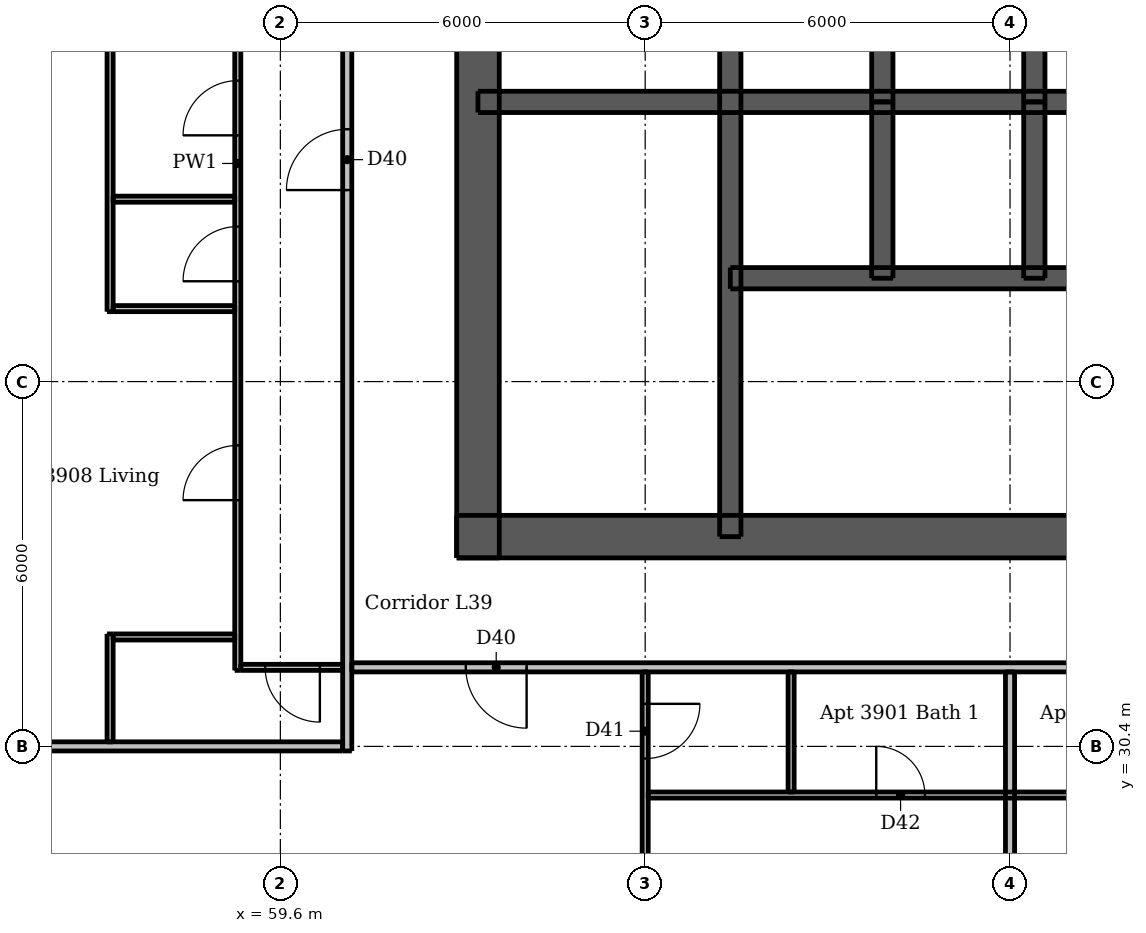
"""IFC4 building model, lengths in metres.
Left out: names, types, materials, properties, quantities, classifications, styles, units other than length and angle.
Written with IfcOpenShell. Run it as: python <this file> out.ifc"""

import sys

from ifc_helpers import new_model, si_unit, direction, frame, frame_2d, origin, place, context, subcontext, project, spatial, rectangle, extrude, element, fill, save


model = new_model("IFC4")
c1 = context("Model", 3, precision=1e-05, world=origin(), true_north=direction((0.0, 1.0)))
c2 = subcontext(c1, "Body", "Model", "MODEL_VIEW")
j1 = project(units=[si_unit("LENGTHUNIT", "METRE"), si_unit("PLANEANGLEUNIT", "RADIAN")], contexts=[c1])
p1 = place(None, origin())
s1 = spatial("IfcSite", under=j1, at=p1, CompositionType="ELEMENT")
p2 = place(p1, origin())
s2 = spatial("IfcBuilding", under=s1, at=p2, CompositionType="ELEMENT")
p3 = place(p2, frame((0.0, 0.0, 147.1)))
s3 = spatial("IfcBuildingStorey", under=s2, at=p3, CompositionType="ELEMENT", Elevation=147.1)
p4 = place(p3, frame((62.5, 33.85, 0.0), z_axis=(0.0, 0.0, 1.0), x_axis=(1.0, 0.0, 0.0)))
e1 = element("IfcWall", 1, at=p4, inside=s3, PredefinedType="SHEAR", context=c2, shape_type="SweptSolid", body=[
    extrude(rectangle(XDim=24.0, YDim=0.7, at=frame_2d((12.0, 0.0))), origin(), (0.0, 0.0, 1.0), 3.0),
])
p5 = place(p4, frame((1.962, 0.0, 0.0)))
e2 = element("IfcOpeningElement", 2, at=p5, cuts=e1, PredefinedType="OPENING", context=c2, shape_type="SweptSolid", body=[
    extrude(rectangle(XDim=1.1, YDim=2.1, at=frame_2d((0.55, 1.05))), frame((0.0, 0.36, 0.0), z_axis=(0.0, -1.0, 0.0), x_axis=(1.0, 0.0, 0.0)), (0.0, 0.0, 1.0), 0.72),
])
p6 = place(p4, frame((20.938, 0.0, 0.0)))
e3 = element("IfcOpeningElement", 3, at=p6, cuts=e1, PredefinedType="OPENING", context=c2, shape_type="SweptSolid", body=[
    extrude(rectangle(XDim=1.1, YDim=2.1, at=frame_2d((0.55, 1.05))), frame((0.0, 0.36, 0.0), z_axis=(0.0, -1.0, 0.0), x_axis=(1.0, 0.0, 0.0)), (0.0, 0.0, 1.0), 0.72),
])
p7 = place(p4, frame((8.0, 0.0, 0.0)))
e4 = element("IfcOpeningElement", 4, at=p7, cuts=e1, PredefinedType="OPENING", context=c2, shape_type="SweptSolid", body=[
    extrude(rectangle(XDim=1.1, YDim=2.1, at=frame_2d((0.55, 1.05))), frame((0.0, 0.36, 0.0), z_axis=(0.0, -1.0, 0.0), x_axis=(1.0, 0.0, 0.0)), (0.0, 0.0, 1.0), 0.72),
])
p8 = place(p4, frame((16.375, 0.0, 0.0)))
e5 = element("IfcOpeningElement", 5, at=p8, cuts=e1, PredefinedType="OPENING", context=c2, shape_type="SweptSolid", body=[
    extrude(rectangle(XDim=0.9, YDim=2.1, at=frame_2d((0.45, 1.05))), frame((0.0, 0.36, 0.0), z_axis=(0.0, -1.0, 0.0), x_axis=(1.0, 0.0, 0.0)), (0.0, 0.0, 1.0), 0.72),
])
p9 = place(p3, frame((62.85, 33.5, 0.0), z_axis=(0.0, 0.0, 1.0), x_axis=(0.0, 1.0, 0.0)))
e6 = element("IfcWall", 6, at=p9, inside=s3, PredefinedType="SHEAR", context=c2, shape_type="SweptSolid", body=[
    extrude(rectangle(XDim=24.0, YDim=0.7, at=frame_2d((12.0, 0.0))), origin(), (0.0, 0.0, 1.0), 3.0),
])
p10 = place(p9, frame((11.2, 0.0, 0.0)))
e7 = element("IfcOpeningElement", 7, at=p10, cuts=e6, PredefinedType="OPENING", context=c2, shape_type="SweptSolid", body=[
    extrude(rectangle(XDim=1.6, YDim=2.1, at=frame_2d((0.8, 1.05))), frame((0.0, 0.36, 0.0), z_axis=(0.0, -1.0, 0.0), x_axis=(1.0, 0.0, 0.0)), (0.0, 0.0, 1.0), 0.72),
])
p11 = place(p3, frame((62.85, 41.0, 0.0), z_axis=(0.0, 0.0, 1.0), x_axis=(1.0, 0.0, 0.0)))
e8 = element("IfcWall", 8, at=p11, inside=s3, PredefinedType="SHEAR", context=c2, shape_type="SweptSolid", body=[
    extrude(rectangle(XDim=23.3, YDim=0.35, at=frame_2d((11.65, 0.0))), origin(), (0.0, 0.0, 1.0), 3.0),
])
p12 = place(p3, frame((67.0, 33.85, 0.0), z_axis=(0.0, 0.0, 1.0), x_axis=(0.0, 1.0, 0.0)))
e9 = element("IfcWall", 9, at=p12, inside=s3, PredefinedType="SHEAR", context=c2, shape_type="SweptSolid", body=[
    extrude(rectangle(XDim=10.05, YDim=0.35, at=frame_2d((5.025, 0.0))), origin(), (0.0, 0.0, 1.0), 3.0),
])
p13 = place(p12, frame((0.55, 0.0, 0.0)))
e10 = element("IfcOpeningElement", 10, at=p13, cuts=e9, PredefinedType="OPENING", context=c2, shape_type="SweptSolid", body=[
    extrude(rectangle(XDim=1.1, YDim=2.1, at=frame_2d((0.55, 1.05))), frame((0.0, 0.185, 0.0), z_axis=(0.0, -1.0, 0.0), x_axis=(1.0, 0.0, 0.0)), (0.0, 0.0, 1.0), 0.37),
])
for number, where, z_axis, x_axis in (
    (11, (69.5, 41.0, 0.0), (0.0, 0.0, 1.0), (0.0, 1.0, 0.0)),
    (12, (72.0, 41.0, 0.0), (0.0, 0.0, 1.0), (0.0, 1.0, 0.0)),
):
    element("IfcWall", number, at=place(p3, frame(where, z_axis=z_axis, x_axis=x_axis)), inside=s3, PredefinedType="SHEAR", context=c2, shape_type="SweptSolid", body=[
        extrude(rectangle(XDim=2.9, YDim=0.35, at=frame_2d((1.45, 0.0))), origin(), (0.0, 0.0, 1.0), 3.0),
    ])
p14 = place(p3, frame((67.0, 38.1, 0.0), z_axis=(0.0, 0.0, 1.0), x_axis=(1.0, 0.0, 0.0)))
e13 = element("IfcWall", 13, at=p14, inside=s3, PredefinedType="SHEAR", context=c2, shape_type="SweptSolid", body=[
    extrude(rectangle(XDim=7.5, YDim=0.35, at=frame_2d((3.75, 0.0))), origin(), (0.0, 0.0, 1.0), 3.0),
])
p15 = place(p14, frame((0.7, 0.0, 0.0)))
e14 = element("IfcOpeningElement", 14, at=p15, cuts=e13, PredefinedType="OPENING", context=c2, shape_type="SweptSolid", body=[
    extrude(rectangle(XDim=1.1, YDim=2.1, at=frame_2d((0.55, 1.05))), frame((0.0, 0.185, 0.0), z_axis=(0.0, -1.0, 0.0), x_axis=(1.0, 0.0, 0.0)), (0.0, 0.0, 1.0), 0.37),
])
p16 = place(p14, frame((3.2, 0.0, 0.0)))
e15 = element("IfcOpeningElement", 15, at=p16, cuts=e13, PredefinedType="OPENING", context=c2, shape_type="SweptSolid", body=[
    extrude(rectangle(XDim=1.1, YDim=2.1, at=frame_2d((0.55, 1.05))), frame((0.0, 0.185, 0.0), z_axis=(0.0, -1.0, 0.0), x_axis=(1.0, 0.0, 0.0)), (0.0, 0.0, 1.0), 0.37),
])
p17 = place(p14, frame((5.65, 0.0, 0.0)))
e16 = element("IfcOpeningElement", 16, at=p17, cuts=e13, PredefinedType="OPENING", context=c2, shape_type="SweptSolid", body=[
    extrude(rectangle(XDim=1.2, YDim=2.1, at=frame_2d((0.6, 1.05))), frame((0.0, 0.185, 0.0), z_axis=(0.0, -1.0, 0.0), x_axis=(1.0, 0.0, 0.0)), (0.0, 0.0, 1.0), 0.37),
])
for number, where, z_axis, x_axis in (
    (17, (69.5, 38.1, 0.0), (0.0, 0.0, 1.0), (0.0, 1.0, 0.0)),
    (18, (72.0, 38.1, 0.0), (0.0, 0.0, 1.0), (0.0, 1.0, 0.0)),
):
    element("IfcWall", number, at=place(p3, frame(where, z_axis=z_axis, x_axis=x_axis)), inside=s3, PredefinedType="SHEAR", context=c2, shape_type="SweptSolid", body=[
        extrude(rectangle(XDim=2.9, YDim=0.35, at=frame_2d((1.45, 0.0))), origin(), (0.0, 0.0, 1.0), 3.0),
    ])
p18 = place(p3, frame((56.8, 30.475, 0.0), z_axis=(0.0, 0.0, 1.0), x_axis=(0.0, 1.0, 0.0)))
e19 = element("IfcWall", 19, at=p18, inside=s3, PredefinedType="PARTITIONING", context=c2, shape_type="SweptSolid", body=[
    extrude(rectangle(XDim=1.775, YDim=0.1, at=frame_2d((0.887, 0.0))), origin(), (0.0, 0.0, 1.0), 3.0),
])
p19 = place(p3, frame((56.8, 37.55, 0.0), z_axis=(0.0, 0.0, 1.0), x_axis=(0.0, 1.0, 0.0)))
e20 = element("IfcWall", 20, at=p19, inside=s3, PredefinedType="PARTITIONING", context=c2, shape_type="SweptSolid", body=[
    extrude(rectangle(XDim=7.3, YDim=0.1, at=frame_2d((3.65, 0.0))), origin(), (0.0, 0.0, 1.0), 3.0),
])
p20 = place(p3, frame((58.9, 31.65, 0.0), z_axis=(0.0, 0.0, 1.0), x_axis=(0.0, 1.0, 0.0)))
e21 = element("IfcWall", 21, at=p20, inside=s3, PredefinedType="PARTITIONING", context=c2, shape_type="SweptSolid", body=[
    extrude(rectangle(XDim=16.675, YDim=0.1, at=frame_2d((8.337, 0.0))), origin(), (0.0, 0.0, 1.0), 3.0),
])
p21 = place(p20, frame((2.8, 0.0, 0.0)))
e22 = element("IfcOpeningElement", 22, at=p21, cuts=e21, PredefinedType="OPENING", context=c2, shape_type="SweptSolid", body=[
    extrude(rectangle(XDim=0.9, YDim=2.1, at=frame_2d((0.45, 1.05))), frame((0.0, 0.06, 0.0), z_axis=(0.0, -1.0, 0.0), x_axis=(1.0, 0.0, 0.0)), (0.0, 0.0, 1.0), 0.12),
])
p22 = place(p20, frame((8.8, 0.0, 0.0)))
e23 = element("IfcOpeningElement", 23, at=p22, cuts=e21, PredefinedType="OPENING", context=c2, shape_type="SweptSolid", body=[
    extrude(rectangle(XDim=0.9, YDim=2.1, at=frame_2d((0.45, 1.05))), frame((0.0, 0.06, 0.0), z_axis=(0.0, -1.0, 0.0), x_axis=(1.0, 0.0, 0.0)), (0.0, 0.0, 1.0), 0.12),
])
p23 = place(p20, frame((6.4, 0.0, 0.0)))
e24 = element("IfcOpeningElement", 24, at=p23, cuts=e21, PredefinedType="OPENING", context=c2, shape_type="SweptSolid", body=[
    extrude(rectangle(XDim=0.9, YDim=2.1, at=frame_2d((0.45, 1.05))), frame((0.0, 0.06, 0.0), z_axis=(0.0, -1.0, 0.0), x_axis=(1.0, 0.0, 0.0)), (0.0, 0.0, 1.0), 0.12),
])
p24 = place(p20, frame((14.5, 0.0, 0.0)))
e25 = element("IfcOpeningElement", 25, at=p24, cuts=e21, PredefinedType="OPENING", context=c2, shape_type="SweptSolid", body=[
    extrude(rectangle(XDim=0.9, YDim=2.1, at=frame_2d((0.45, 1.05))), frame((0.0, 0.06, 0.0), z_axis=(0.0, -1.0, 0.0), x_axis=(1.0, 0.0, 0.0)), (0.0, 0.0, 1.0), 0.12),
])
p25 = place(p20, frame((11.55, 0.0, 0.0)))
e26 = element("IfcOpeningElement", 26, at=p25, cuts=e21, PredefinedType="OPENING", context=c2, shape_type="SweptSolid", body=[
    extrude(rectangle(XDim=0.8, YDim=2.1, at=frame_2d((0.4, 1.05))), frame((0.0, 0.06, 0.0), z_axis=(0.0, -1.0, 0.0), x_axis=(1.0, 0.0, 0.0)), (0.0, 0.0, 1.0), 0.12),
])
p26 = place(p3, frame((65.6, 31.625, 0.0), z_axis=(0.0, 0.0, 1.0), x_axis=(0.0, -1.0, 0.0)))
e27 = element("IfcWall", 27, at=p26, inside=s3, PredefinedType="PARTITIONING", context=c2, shape_type="SweptSolid", body=[
    extrude(rectangle(XDim=9.125, YDim=0.1, at=frame_2d((4.562, 0.0))), origin(), (0.0, 0.0, 1.0), 2.466),
])
p27 = place(p26, frame((0.525, 0.0, 0.0)))
e28 = element("IfcOpeningElement", 28, at=p27, cuts=e27, PredefinedType="OPENING", context=c2, shape_type="SweptSolid", body=[
    extrude(rectangle(XDim=0.9, YDim=2.1, at=frame_2d((0.45, 1.05))), frame((0.0, 0.06, 0.0), z_axis=(0.0, -1.0, 0.0), x_axis=(1.0, 0.0, 0.0)), (0.0, 0.0, 1.0), 0.12),
])
p28 = place(p26, frame((5.125, 0.0, 0.0)))
e29 = element("IfcOpeningElement", 29, at=p28, cuts=e27, PredefinedType="OPENING", context=c2, shape_type="SweptSolid", body=[
    extrude(rectangle(XDim=0.9, YDim=2.1, at=frame_2d((0.45, 1.05))), frame((0.0, 0.06, 0.0), z_axis=(0.0, -1.0, 0.0), x_axis=(1.0, 0.0, 0.0)), (0.0, 0.0, 1.0), 0.12),
])
p29 = place(p3, frame((68.0, 29.65, 0.0), z_axis=(0.0, 0.0, 1.0), x_axis=(0.0, 1.0, 0.0)))
e30 = element("IfcWall", 30, at=p29, inside=s3, PredefinedType="PARTITIONING", context=c2, shape_type="SweptSolid", body=[
    extrude(rectangle(XDim=1.975, YDim=0.1, at=frame_2d((0.988, 0.0))), origin(), (0.0, 0.0, 1.0), 3.0),
])
for number, where, z_axis, x_axis in (
    (31, (56.85, 39.4, 0.0), (0.0, 0.0, 1.0), (1.0, 0.0, 0.0)),
    (32, (56.85, 37.6, 0.0), (0.0, 0.0, 1.0), (1.0, 0.0, 0.0)),
    (33, (56.85, 32.2, 0.0), (0.0, 0.0, 1.0), (1.0, 0.0, 0.0)),
):
    element("IfcWall", number, at=place(p3, frame(where, z_axis=z_axis, x_axis=x_axis)), inside=s3, PredefinedType="PARTITIONING", context=c2, shape_type="SweptSolid", body=[
        extrude(rectangle(XDim=2.0, YDim=0.1, at=frame_2d((1.0, 0.0))), origin(), (0.0, 0.0, 1.0), 3.0),
    ])
p30 = place(p3, frame((60.625, 31.7, 0.0), z_axis=(0.0, 0.0, 1.0), x_axis=(-1.0, 0.0, 0.0)))
e34 = element("IfcWall", 34, at=p30, inside=s3, PredefinedType="PARTITIONING", context=c2, shape_type="SweptSolid", body=[
    extrude(rectangle(XDim=1.675, YDim=0.1, at=frame_2d((0.837, 0.0))), origin(), (0.0, 0.0, 1.0), 3.0),
])
p31 = place(p30, frame((0.375, 0.0, 0.0)))
e35 = element("IfcOpeningElement", 35, at=p31, cuts=e34, PredefinedType="OPENING", context=c2, shape_type="SweptSolid", body=[
    extrude(rectangle(XDim=0.9, YDim=2.1, at=frame_2d((0.45, 1.05))), frame((0.0, 0.06, 0.0), z_axis=(0.0, -1.0, 0.0), x_axis=(1.0, 0.0, 0.0)), (0.0, 0.0, 1.0), 0.12),
])
p32 = place(p3, frame((65.65, 29.6, 0.0), z_axis=(0.0, 0.0, 1.0), x_axis=(1.0, 0.0, 0.0)))
e36 = element("IfcWall", 36, at=p32, inside=s3, PredefinedType="PARTITIONING", context=c2, shape_type="SweptSolid", body=[
    extrude(rectangle(XDim=8.9, YDim=0.1, at=frame_2d((4.45, 0.0))), origin(), (0.0, 0.0, 1.0), 3.0),
])
p33 = place(p32, frame((3.75, 0.0, 0.0)))
e37 = element("IfcOpeningElement", 37, at=p33, cuts=e36, PredefinedType="OPENING", context=c2, shape_type="SweptSolid", body=[
    extrude(rectangle(XDim=0.8, YDim=2.1, at=frame_2d((0.4, 1.05))), frame((0.0, 0.06, 0.0), z_axis=(0.0, -1.0, 0.0), x_axis=(1.0, 0.0, 0.0)), (0.0, 0.0, 1.0), 0.12),
])
p34 = place(p32, frame((7.0, 0.0, 0.0)))
e38 = element("IfcOpeningElement", 38, at=p34, cuts=e36, PredefinedType="OPENING", context=c2, shape_type="SweptSolid", body=[
    extrude(rectangle(XDim=0.9, YDim=2.1, at=frame_2d((0.45, 1.05))), frame((0.0, 0.06, 0.0), z_axis=(0.0, -1.0, 0.0), x_axis=(1.0, 0.0, 0.0)), (0.0, 0.0, 1.0), 0.12),
])
p35 = place(p3, frame((60.7, 30.325, 0.0), z_axis=(0.0, 0.0, 1.0), x_axis=(0.0, 1.0, 0.0)))
e39 = element("IfcWall", 39, at=p35, inside=s3, PredefinedType="PARTITIONING", context=c2, shape_type="SweptSolid", body=[
    extrude(rectangle(XDim=28.9, YDim=0.15, at=frame_2d((14.45, 0.0))), origin(), (0.0, 0.0, 1.0), 3.0),
])
p36 = place(p35, frame((9.225, 0.0, 0.0)))
e40 = element("IfcOpeningElement", 40, at=p36, cuts=e39, PredefinedType="OPENING", context=c2, shape_type="SweptSolid", body=[
    extrude(rectangle(XDim=1.0, YDim=2.1, at=frame_2d((0.5, 1.05))), frame((0.0, 0.085, 0.0), z_axis=(0.0, -1.0, 0.0), x_axis=(1.0, 0.0, 0.0)), (0.0, 0.0, 1.0), 0.17),
])
p37 = place(p35, frame((26.025, 0.0, 0.0)))
e41 = element("IfcOpeningElement", 41, at=p37, cuts=e39, PredefinedType="OPENING", context=c2, shape_type="SweptSolid", body=[
    extrude(rectangle(XDim=1.0, YDim=2.1, at=frame_2d((0.5, 1.05))), frame((0.0, 0.085, 0.0), z_axis=(0.0, -1.0, 0.0), x_axis=(1.0, 0.0, 0.0)), (0.0, 0.0, 1.0), 0.17),
])
p38 = place(p3, frame((71.6, 24.0, 0.0), z_axis=(0.0, 0.0, 1.0), x_axis=(0.0, 1.0, 0.0)))
e42 = element("IfcWall", 42, at=p38, inside=s3, PredefinedType="PARTITIONING", context=c2, shape_type="SweptSolid", body=[
    extrude(rectangle(XDim=7.625, YDim=0.15, at=frame_2d((3.812, 0.0))), origin(), (0.0, 0.0, 1.0), 2.54),
])
p39 = place(p3, frame((89.525, 31.7, 0.0), z_axis=(0.0, 0.0, 1.0), x_axis=(-1.0, 0.0, 0.0)))
e43 = element("IfcWall", 43, at=p39, inside=s3, PredefinedType="PARTITIONING", context=c2, shape_type="SweptSolid", body=[
    extrude(rectangle(XDim=28.75, YDim=0.15, at=frame_2d((14.375, 0.0))), origin(), (0.0, 0.0, 1.0), 3.0),
])
p40 = place(p39, frame((25.875, 0.0, 0.0)))
e44 = element("IfcOpeningElement", 44, at=p40, cuts=e43, PredefinedType="OPENING", context=c2, shape_type="SweptSolid", body=[
    extrude(rectangle(XDim=1.0, YDim=2.1, at=frame_2d((0.5, 1.05))), frame((0.0, 0.085, 0.0), z_axis=(0.0, -1.0, 0.0), x_axis=(1.0, 0.0, 0.0)), (0.0, 0.0, 1.0), 0.17),
])
p41 = place(p39, frame((9.925, 0.0, 0.0)))
e45 = element("IfcOpeningElement", 45, at=p41, cuts=e43, PredefinedType="OPENING", context=c2, shape_type="SweptSolid", body=[
    extrude(rectangle(XDim=1.0, YDim=2.1, at=frame_2d((0.5, 1.05))), frame((0.0, 0.085, 0.0), z_axis=(0.0, -1.0, 0.0), x_axis=(1.0, 0.0, 0.0)), (0.0, 0.0, 1.0), 0.17),
])
p42 = place(p3, frame((52.0, 30.4, 0.0), z_axis=(0.0, 0.0, 1.0), x_axis=(1.0, 0.0, 0.0)))
e46 = element("IfcWall", 46, at=p42, inside=s3, PredefinedType="PARTITIONING", context=c2, shape_type="SweptSolid", body=[
    extrude(rectangle(XDim=8.625, YDim=0.15, at=frame_2d((4.312, 0.0))), origin(), (0.0, 0.0, 1.0), 2.597),
])
p43 = place(p5, origin())
e47 = element("IfcDoor", 47, at=p43, inside=s3, OperationType="SINGLE_SWING_LEFT", PredefinedType="DOOR", context=c2, shape_type="SweptSolid", body=[
    extrude(rectangle(XDim=1.1, YDim=2.1, at=frame_2d((0.55, 1.05))), frame((0.0, 0.337, 0.0), z_axis=(0.0, -1.0, 0.0), x_axis=(1.0, 0.0, 0.0)), (0.0, 0.0, 1.0), 0.05),
])
fill(e2, e47)
p44 = place(p7, origin())
e48 = element("IfcDoor", 48, at=p44, inside=s3, OperationType="SINGLE_SWING_LEFT", PredefinedType="DOOR", context=c2, shape_type="SweptSolid", body=[
    extrude(rectangle(XDim=1.1, YDim=2.1, at=frame_2d((0.55, 1.05))), frame((0.0, 0.337, 0.0), z_axis=(0.0, -1.0, 0.0), x_axis=(1.0, 0.0, 0.0)), (0.0, 0.0, 1.0), 0.05),
])
fill(e4, e48)
p45 = place(p13, origin())
e49 = element("IfcDoor", 49, at=p45, inside=s3, OperationType="SINGLE_SWING_RIGHT", PredefinedType="DOOR", context=c2, shape_type="SweptSolid", body=[
    extrude(rectangle(XDim=1.1, YDim=2.1, at=frame_2d((0.55, 1.05))), frame((0.0, -0.112, 0.0), z_axis=(0.0, -1.0, 0.0), x_axis=(1.0, 0.0, 0.0)), (0.0, 0.0, 1.0), 0.05),
])
fill(e10, e49)
p46 = place(p15, origin())
e50 = element("IfcDoor", 50, at=p46, inside=s3, OperationType="DOUBLE_DOOR_SLIDING", PredefinedType="DOOR", context=c2, shape_type="SweptSolid", body=[
    extrude(rectangle(XDim=1.1, YDim=2.1, at=frame_2d((0.55, 1.05))), frame((0.0, 0.025, 0.0), z_axis=(0.0, -1.0, 0.0), x_axis=(1.0, 0.0, 0.0)), (0.0, 0.0, 1.0), 0.05),
])
fill(e14, e50)
p47 = place(p16, origin())
e51 = element("IfcDoor", 51, at=p47, inside=s3, OperationType="DOUBLE_DOOR_SLIDING", PredefinedType="DOOR", context=c2, shape_type="SweptSolid", body=[
    extrude(rectangle(XDim=1.1, YDim=2.1, at=frame_2d((0.55, 1.05))), frame((0.0, 0.025, 0.0), z_axis=(0.0, -1.0, 0.0), x_axis=(1.0, 0.0, 0.0)), (0.0, 0.0, 1.0), 0.05),
])
fill(e15, e51)
p48 = place(p40, origin())
e52 = element("IfcDoor", 52, at=p48, inside=s3, OperationType="SINGLE_SWING_LEFT", PredefinedType="DOOR", context=c2, shape_type="SweptSolid", body=[
    extrude(rectangle(XDim=1.0, YDim=2.1, at=frame_2d((0.5, 1.05))), frame((0.0, 0.025, 0.0), z_axis=(0.0, -1.0, 0.0), x_axis=(1.0, 0.0, 0.0)), (0.0, 0.0, 1.0), 0.05),
])
fill(e44, e52)
p49 = place(p27, origin())
e53 = element("IfcDoor", 53, at=p49, inside=s3, OperationType="SINGLE_SWING_LEFT", PredefinedType="DOOR", context=c2, shape_type="SweptSolid", body=[
    extrude(rectangle(XDim=0.9, YDim=2.1, at=frame_2d((0.45, 1.05))), frame((0.0, 0.025, 0.0), z_axis=(0.0, -1.0, 0.0), x_axis=(1.0, 0.0, 0.0)), (0.0, 0.0, 1.0), 0.05),
])
fill(e28, e53)
p50 = place(p33, origin())
e54 = element("IfcDoor", 54, at=p50, inside=s3, OperationType="SINGLE_SWING_LEFT", PredefinedType="DOOR", context=c2, shape_type="SweptSolid", body=[
    extrude(rectangle(XDim=0.8, YDim=2.1, at=frame_2d((0.4, 1.05))), frame((0.0, 0.025, 0.0), z_axis=(0.0, -1.0, 0.0), x_axis=(1.0, 0.0, 0.0)), (0.0, 0.0, 1.0), 0.05),
])
fill(e37, e54)
p51 = place(p36, origin())
e55 = element("IfcDoor", 55, at=p51, inside=s3, OperationType="SINGLE_SWING_LEFT", PredefinedType="DOOR", context=c2, shape_type="SweptSolid", body=[
    extrude(rectangle(XDim=1.0, YDim=2.1, at=frame_2d((0.5, 1.05))), frame((0.0, 0.025, 0.0), z_axis=(0.0, -1.0, 0.0), x_axis=(1.0, 0.0, 0.0)), (0.0, 0.0, 1.0), 0.05),
])
fill(e40, e55)
p52 = place(p21, origin())
e56 = element("IfcDoor", 56, at=p52, inside=s3, OperationType="SINGLE_SWING_LEFT", PredefinedType="DOOR", context=c2, shape_type="SweptSolid", body=[
    extrude(rectangle(XDim=0.9, YDim=2.1, at=frame_2d((0.45, 1.05))), frame((0.0, 0.025, 0.0), z_axis=(0.0, -1.0, 0.0), x_axis=(1.0, 0.0, 0.0)), (0.0, 0.0, 1.0), 0.05),
])
fill(e22, e56)
p53 = place(p22, origin())
e57 = element("IfcDoor", 57, at=p53, inside=s3, OperationType="SINGLE_SWING_LEFT", PredefinedType="DOOR", context=c2, shape_type="SweptSolid", body=[
    extrude(rectangle(XDim=0.9, YDim=2.1, at=frame_2d((0.45, 1.05))), frame((0.0, 0.025, 0.0), z_axis=(0.0, -1.0, 0.0), x_axis=(1.0, 0.0, 0.0)), (0.0, 0.0, 1.0), 0.05),
])
fill(e23, e57)
p54 = place(p23, origin())
e58 = element("IfcDoor", 58, at=p54, inside=s3, OperationType="SINGLE_SWING_LEFT", PredefinedType="DOOR", context=c2, shape_type="SweptSolid", body=[
    extrude(rectangle(XDim=0.9, YDim=2.1, at=frame_2d((0.45, 1.05))), frame((0.0, 0.025, 0.0), z_axis=(0.0, -1.0, 0.0), x_axis=(1.0, 0.0, 0.0)), (0.0, 0.0, 1.0), 0.05),
])
fill(e24, e58)
p55 = place(p31, origin())
e59 = element("IfcDoor", 59, at=p55, inside=s3, OperationType="SINGLE_SWING_LEFT", PredefinedType="DOOR", context=c2, shape_type="SweptSolid", body=[
    extrude(rectangle(XDim=0.9, YDim=2.1, at=frame_2d((0.45, 1.05))), frame((0.0, 0.025, 0.0), z_axis=(0.0, -1.0, 0.0), x_axis=(1.0, 0.0, 0.0)), (0.0, 0.0, 1.0), 0.05),
])
fill(e35, e59)
save(model, sys.argv[1])
